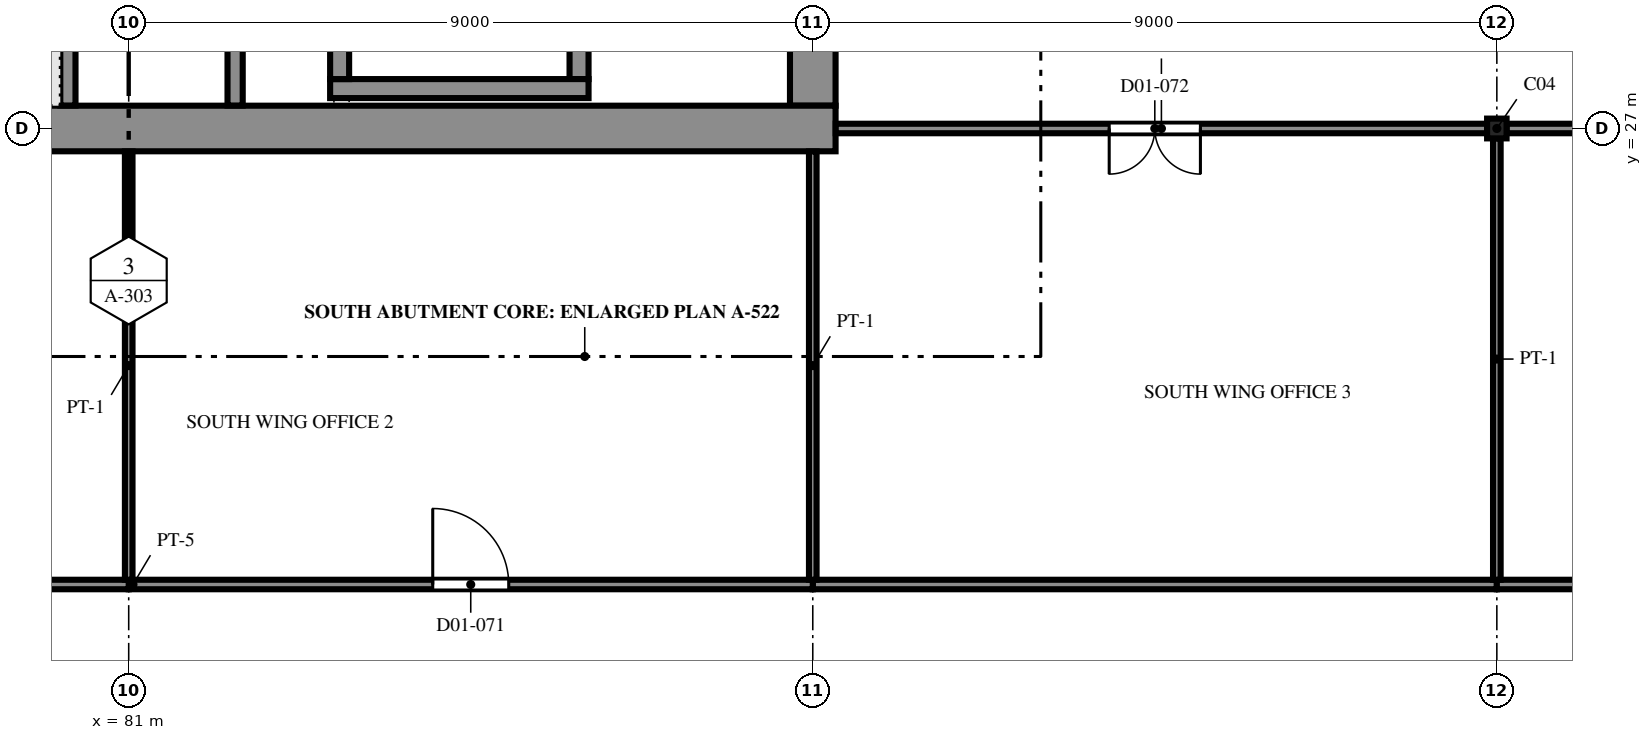
"""IFC4 building model, lengths in metres.
Left out: names, types, materials, properties, quantities, classifications, styles, units other than length and angle.
Written with IfcOpenShell. Run it as: python <this file> out.ifc"""

import sys

from ifc_helpers import new_model, si_unit, direction, frame, frame_2d, origin, origin_2d, place, context, subcontext, project, spatial, polyline, rectangle, i_section, outline, extrude, element, fill, save


model = new_model("IFC4")
c1 = context("Model", 3, precision=1e-05, world=origin(), true_north=direction((0.0, 1.0)))
c2 = subcontext(c1, "Body", "Model", "MODEL_VIEW")
j1 = project(units=[si_unit("LENGTHUNIT", "METRE"), si_unit("PLANEANGLEUNIT", "RADIAN")], contexts=[c1])
p1 = place(None, origin())
s1 = spatial("IfcSite", under=j1, at=p1, CompositionType="ELEMENT")
p2 = place(p1, origin())
s2 = spatial("IfcBuilding", under=s1, at=p2, CompositionType="ELEMENT")
p3 = place(p2, frame((0.0, 0.0, 7.5)))
s3 = spatial("IfcBuildingStorey", under=s2, at=p3, CompositionType="ELEMENT", Elevation=7.5)
p4 = place(p3, frame((99.0, 27.0, 0.0), z_axis=(0.0, 0.0, 1.0), x_axis=(1.0, 0.0, 0.0)))
e1 = element("IfcColumn", 1, at=p4, inside=s3, PredefinedType="COLUMN", context=c2, shape_type="SweptSolid", body=[
    extrude(i_section(OverallWidth=0.256, OverallDepth=0.26, WebThickness=0.01, FlangeThickness=0.017, FilletRadius=0.013, at=origin_2d()), origin(), (0.0, 0.0, 1.0), 4.2),
])
p5 = place(p3, frame((71.7, 27.0, 0.0), z_axis=(0.0, 0.0, 1.0), x_axis=(1.0, 0.0, 0.0)))
e2 = element("IfcWall", 2, at=p5, inside=s3, PredefinedType="SOLIDWALL", context=c2, shape_type="SweptSolid", body=[
    extrude(rectangle(XDim=18.6, YDim=0.6, at=frame_2d((9.3, 0.0))), origin(), (0.0, 0.0, 1.0), 4.2),
])
p6 = place(p3, frame((90.0, 27.3, 0.0), z_axis=(0.0, 0.0, 1.0), x_axis=(0.0, 1.0, 0.0)))
e3 = element("IfcWall", 3, at=p6, inside=s3, PredefinedType="SOLIDWALL", context=c2, shape_type="SweptSolid", body=[
    extrude(rectangle(XDim=8.4, YDim=0.6, at=frame_2d((4.2, 0.0))), origin(), (0.0, 0.0, 1.0), 4.2),
])
p7 = place(p6, frame((3.8, 0.0, 0.0)))
e4 = element("IfcOpeningElement", 4, at=p7, cuts=e3, PredefinedType="OPENING", context=c2, shape_type="SweptSolid", body=[
    extrude(rectangle(XDim=1.8, YDim=2.1, at=frame_2d((0.9, 1.05))), frame((0.0, 0.31, 0.0), z_axis=(0.0, -1.0, 0.0), x_axis=(1.0, 0.0, 0.0)), (0.0, 0.0, 1.0), 0.62),
])
p8 = place(p6, frame((6.95, 0.0, 0.0)))
e5 = element("IfcOpeningElement", 5, at=p8, cuts=e3, PredefinedType="OPENING", context=c2, shape_type="SweptSolid", body=[
    extrude(rectangle(XDim=0.9, YDim=2.1, at=frame_2d((0.45, 1.05))), frame((0.0, 0.31, 0.0), z_axis=(0.0, -1.0, 0.0), x_axis=(1.0, 0.0, 0.0)), (0.0, 0.0, 1.0), 0.62),
])
p9 = place(p3, frame((80.2, 27.302, -0.13), z_axis=(0.0, 0.0, 1.0), x_axis=(0.0, 1.0, 0.0)))
e6 = element("IfcWall", 6, at=p9, inside=s3, PredefinedType="SOLIDWALL", context=c2, shape_type="SweptSolid", body=[
    extrude(rectangle(XDim=8.396, YDim=0.2, at=frame_2d((4.198, 0.0))), origin(), (0.0, 0.0, 1.0), 3.646),
])
p10 = place(p3, frame((82.4, 27.302, 0.0), z_axis=(0.0, 0.0, 1.0), x_axis=(0.0, 1.0, 0.0)))
e7 = element("IfcWall", 7, at=p10, inside=s3, PredefinedType="SOLIDWALL", context=c2, shape_type="SweptSolid", body=[
    extrude(rectangle(XDim=2.898, YDim=0.2, at=frame_2d((1.449, 0.0))), origin(), (0.0, 0.0, 1.0), 3.516),
])
p11 = place(p3, frame((83.65, 27.525, 0.0), z_axis=(0.0, 0.0, 1.0), x_axis=(1.0, 0.0, 0.0)))
e8 = element("IfcWall", 8, at=p11, inside=s3, PredefinedType="SOLIDWALL", context=c2, shape_type="SweptSolid", body=[
    extrude(rectangle(XDim=3.4, YDim=0.25, at=frame_2d((1.7, 0.0))), origin(), (0.0, 0.0, 1.0), 3.516),
])
p12 = place(p3, frame((83.775, 27.65, 0.0), z_axis=(0.0, 0.0, 1.0), x_axis=(0.0, 1.0, 0.0)))
e9 = element("IfcWall", 9, at=p12, inside=s3, PredefinedType="SOLIDWALL", context=c2, shape_type="SweptSolid", body=[
    extrude(rectangle(XDim=2.2, YDim=0.25, at=frame_2d((1.1, 0.0))), origin(), (0.0, 0.0, 1.0), 3.516),
])
p13 = place(p3, frame((86.925, 27.65, 0.0), z_axis=(0.0, 0.0, 1.0), x_axis=(0.0, 1.0, 0.0)))
e10 = element("IfcWall", 10, at=p13, inside=s3, PredefinedType="SOLIDWALL", context=c2, shape_type="SweptSolid", body=[
    extrude(rectangle(XDim=2.2, YDim=0.25, at=frame_2d((1.1, 0.0))), origin(), (0.0, 0.0, 1.0), 3.516),
])
p14 = place(p13, frame((0.5, 0.0, 0.0)))
e11 = element("IfcOpeningElement", 11, at=p14, cuts=e10, PredefinedType="OPENING", context=c2, shape_type="SweptSolid", body=[
    extrude(rectangle(XDim=1.2, YDim=2.1, at=frame_2d((0.6, 1.05))), frame((0.0, 0.135, 0.0), z_axis=(0.0, -1.0, 0.0), x_axis=(1.0, 0.0, 0.0)), (0.0, 0.0, 1.0), 0.27),
])
p15 = place(p3, frame((90.0, 21.0, 0.0), z_axis=(0.0, 0.0, 1.0), x_axis=(1.0, 0.0, 0.0)))
e12 = element("IfcWall", 12, at=p15, inside=s3, PredefinedType="PARTITIONING", context=c2, shape_type="SweptSolid", body=[
    extrude(rectangle(XDim=9.0, YDim=0.125, at=frame_2d((4.5, 0.0))), origin(), (0.0, 0.0, 1.0), 3.307),
])
p16 = place(p3, frame((99.0, 21.0, 0.0), z_axis=(0.0, 0.0, 1.0), x_axis=(1.0, 0.0, 0.0)))
e13 = element("IfcWall", 13, at=p16, inside=s3, PredefinedType="PARTITIONING", context=c2, shape_type="SweptSolid", body=[
    extrude(rectangle(XDim=9.062, YDim=0.125, at=frame_2d((4.531, 0.0))), origin(), (0.0, 0.0, 1.0), 3.307),
])
p17 = place(p3, frame((81.0, 21.0, 0.0), z_axis=(0.0, 0.0, 1.0), x_axis=(1.0, 0.0, 0.0)))
e14 = element("IfcWall", 14, at=p17, inside=s3, PredefinedType="PARTITIONING", context=c2, shape_type="SweptSolid", body=[
    extrude(rectangle(XDim=9.0, YDim=0.125, at=frame_2d((4.5, 0.0))), origin(), (0.0, 0.0, 1.0), 3.307),
])
p18 = place(p17, frame((4.0, 0.0, 0.0)))
e15 = element("IfcOpeningElement", 15, at=p18, cuts=e14, PredefinedType="OPENING", context=c2, shape_type="SweptSolid", body=[
    extrude(rectangle(XDim=1.0, YDim=2.1, at=frame_2d((0.5, 1.05))), frame((0.0, 0.073, 0.0), z_axis=(0.0, -1.0, 0.0), x_axis=(1.0, 0.0, 0.0)), (0.0, 0.0, 1.0), 0.145),
])
p19 = place(p3, frame((72.0, 21.0, 0.0), z_axis=(0.0, 0.0, 1.0), x_axis=(1.0, 0.0, 0.0)))
e16 = element("IfcWall", 16, at=p19, inside=s3, PredefinedType="PARTITIONING", context=c2, shape_type="SweptSolid", body=[
    extrude(rectangle(XDim=9.0, YDim=0.125, at=frame_2d((4.5, 0.0))), origin(), (0.0, 0.0, 1.0), 3.307),
])
p20 = place(p19, frame((4.0, 0.0, 0.0)))
e17 = element("IfcOpeningElement", 17, at=p20, cuts=e16, PredefinedType="OPENING", context=c2, shape_type="SweptSolid", body=[
    extrude(rectangle(XDim=1.0, YDim=2.1, at=frame_2d((0.5, 1.05))), frame((0.0, 0.073, 0.0), z_axis=(0.0, -1.0, 0.0), x_axis=(1.0, 0.0, 0.0)), (0.0, 0.0, 1.0), 0.145),
])
p21 = place(p3, frame((98.872, 27.0, 0.0), z_axis=(0.0, 0.0, 1.0), x_axis=(-1.0, 0.0, 0.0)))
e18 = element("IfcWall", 18, at=p21, inside=s3, PredefinedType="PARTITIONING", context=c2, shape_type="SweptSolid", body=[
    extrude(rectangle(XDim=8.57, YDim=0.125, at=frame_2d((4.285, 0.0))), origin(), (0.0, 0.0, 1.0), 3.307),
])
p22 = place(p21, frame((3.772, 0.0, 0.0)))
e19 = element("IfcOpeningElement", 19, at=p22, cuts=e18, PredefinedType="OPENING", context=c2, shape_type="SweptSolid", body=[
    extrude(rectangle(XDim=1.2, YDim=2.1, at=frame_2d((0.6, 1.05))), frame((0.0, 0.073, 0.0), z_axis=(0.0, -1.0, 0.0), x_axis=(1.0, 0.0, 0.0)), (0.0, 0.0, 1.0), 0.145),
])
p23 = place(p3, frame((107.872, 27.0, 0.0), z_axis=(0.0, 0.0, 1.0), x_axis=(-1.0, 0.0, 0.0)))
e20 = element("IfcWall", 20, at=p23, inside=s3, PredefinedType="PARTITIONING", context=c2, shape_type="SweptSolid", body=[
    extrude(rectangle(XDim=8.744, YDim=0.125, at=frame_2d((4.372, 0.0))), origin(), (0.0, 0.0, 1.0), 3.307),
])
p24 = place(p23, frame((3.772, 0.0, 0.0)))
e21 = element("IfcOpeningElement", 21, at=p24, cuts=e20, PredefinedType="OPENING", context=c2, shape_type="SweptSolid", body=[
    extrude(rectangle(XDim=1.2, YDim=2.1, at=frame_2d((0.6, 1.05))), frame((0.0, 0.073, 0.0), z_axis=(0.0, -1.0, 0.0), x_axis=(1.0, 0.0, 0.0)), (0.0, 0.0, 1.0), 0.145),
])
for number, where, z_axis, x_axis in (
    (22, (81.0, 26.698, 0.0), (0.0, 0.0, 1.0), (0.0, -1.0, 0.0)),
    (23, (90.0, 26.698, 0.0), (0.0, 0.0, 1.0), (0.0, -1.0, 0.0)),
):
    element("IfcWall", number, at=place(p3, frame(where, z_axis=z_axis, x_axis=x_axis)), inside=s3, PredefinedType="PARTITIONING", context=c2, shape_type="SweptSolid", body=[
        extrude(rectangle(XDim=5.635, YDim=0.1, at=frame_2d((2.818, 0.0))), origin(), (0.0, 0.0, 1.0), 3.643),
    ])
p25 = place(p3, frame((99.0, 26.87, 0.0), z_axis=(0.0, 0.0, 1.0), x_axis=(0.0, -1.0, 0.0)))
e24 = element("IfcWall", 24, at=p25, inside=s3, PredefinedType="PARTITIONING", context=c2, shape_type="SweptSolid", body=[
    extrude(rectangle(XDim=5.807, YDim=0.1, at=frame_2d((2.904, 0.0))), origin(), (0.0, 0.0, 1.0), 3.643),
])
p26 = place(p18, origin())
e25 = element("IfcDoor", 25, at=p26, inside=s3, OperationType="SINGLE_SWING_LEFT", PredefinedType="DOOR", context=c2, shape_type="SweptSolid", body=[
    extrude(outline(polyline([(0.0, 0.0), (0.07, 0.0), (0.07, 2.03), (0.93, 2.03), (0.93, 0.0), (1.0, 0.0), (1.0, 2.1), (0.0, 2.1), (0.0, 0.0)])), frame((0.0, 0.025, 0.0), z_axis=(0.0, -1.0, 0.0), x_axis=(1.0, 0.0, 0.0)), (0.0, 0.0, 1.0), 0.05),
    extrude(outline(polyline([(0.074, 0.01), (0.926, 0.01), (0.926, 2.026), (0.074, 2.026), (0.074, 0.01)]), holes=[polyline([(0.194, 0.16), (0.806, 0.16), (0.806, 1.01), (0.194, 1.01), (0.194, 0.16)]), polyline([(0.35, 1.16), (0.65, 1.16), (0.65, 1.76), (0.35, 1.76), (0.35, 1.16)])]), frame((0.0, 0.017, 0.0), z_axis=(0.0, -1.0, 0.0), x_axis=(1.0, 0.0, 0.0)), (0.0, 0.0, 1.0), 0.035),
    extrude(rectangle(XDim=0.612, YDim=0.85, at=frame_2d((0.5, 0.585))), frame((0.0, 0.009, 0.0), z_axis=(0.0, -1.0, 0.0), x_axis=(1.0, 0.0, 0.0)), (0.0, 0.0, 1.0), 0.017),
    extrude(rectangle(XDim=0.3, YDim=0.6, at=frame_2d((0.5, 1.46))), frame((0.0, 0.006, 0.0), z_axis=(0.0, -1.0, 0.0), x_axis=(1.0, 0.0, 0.0)), (0.0, 0.0, 1.0), 0.012),
])
fill(e15, e25)
p27 = place(p22, origin())
e26 = element("IfcDoor", 26, at=p27, inside=s3, OperationType="DOUBLE_DOOR_SINGLE_SWING", PredefinedType="DOOR", context=c2, shape_type="SweptSolid", body=[
    extrude(outline(polyline([(0.0, 0.0), (0.07, 0.0), (0.07, 2.03), (1.13, 2.03), (1.13, 0.0), (1.2, 0.0), (1.2, 2.1), (0.0, 2.1), (0.0, 0.0)])), frame((0.0, 0.025, 0.0), z_axis=(0.0, -1.0, 0.0), x_axis=(1.0, 0.0, 0.0)), (0.0, 0.0, 1.0), 0.05),
    extrude(outline(polyline([(0.074, 0.01), (0.597, 0.01), (0.597, 2.026), (0.074, 2.026), (0.074, 0.01)]), holes=[polyline([(0.178, 0.373), (0.492, 0.373), (0.492, 1.784), (0.178, 1.784), (0.178, 0.373)])]), frame((0.0, 0.017, 0.0), z_axis=(0.0, -1.0, 0.0), x_axis=(1.0, 0.0, 0.0)), (0.0, 0.0, 1.0), 0.035),
    extrude(rectangle(XDim=0.314, YDim=1.411, at=frame_2d((0.335, 1.079))), frame((0.0, 0.009, 0.0), z_axis=(0.0, -1.0, 0.0), x_axis=(1.0, 0.0, 0.0)), (0.0, 0.0, 1.0), 0.017),
    extrude(outline(polyline([(0.603, 0.01), (1.126, 0.01), (1.126, 2.026), (0.603, 2.026), (0.603, 0.01)]), holes=[polyline([(0.708, 0.373), (1.021, 0.373), (1.021, 1.784), (0.708, 1.784), (0.708, 0.373)])]), frame((0.0, 0.017, 0.0), z_axis=(0.0, -1.0, 0.0), x_axis=(1.0, 0.0, 0.0)), (0.0, 0.0, 1.0), 0.035),
    extrude(rectangle(XDim=0.314, YDim=1.411, at=frame_2d((0.865, 1.079))), frame((0.0, 0.009, 0.0), z_axis=(0.0, -1.0, 0.0), x_axis=(1.0, 0.0, 0.0)), (0.0, 0.0, 1.0), 0.017),
])
fill(e19, e26)
save(model, sys.argv[1])
